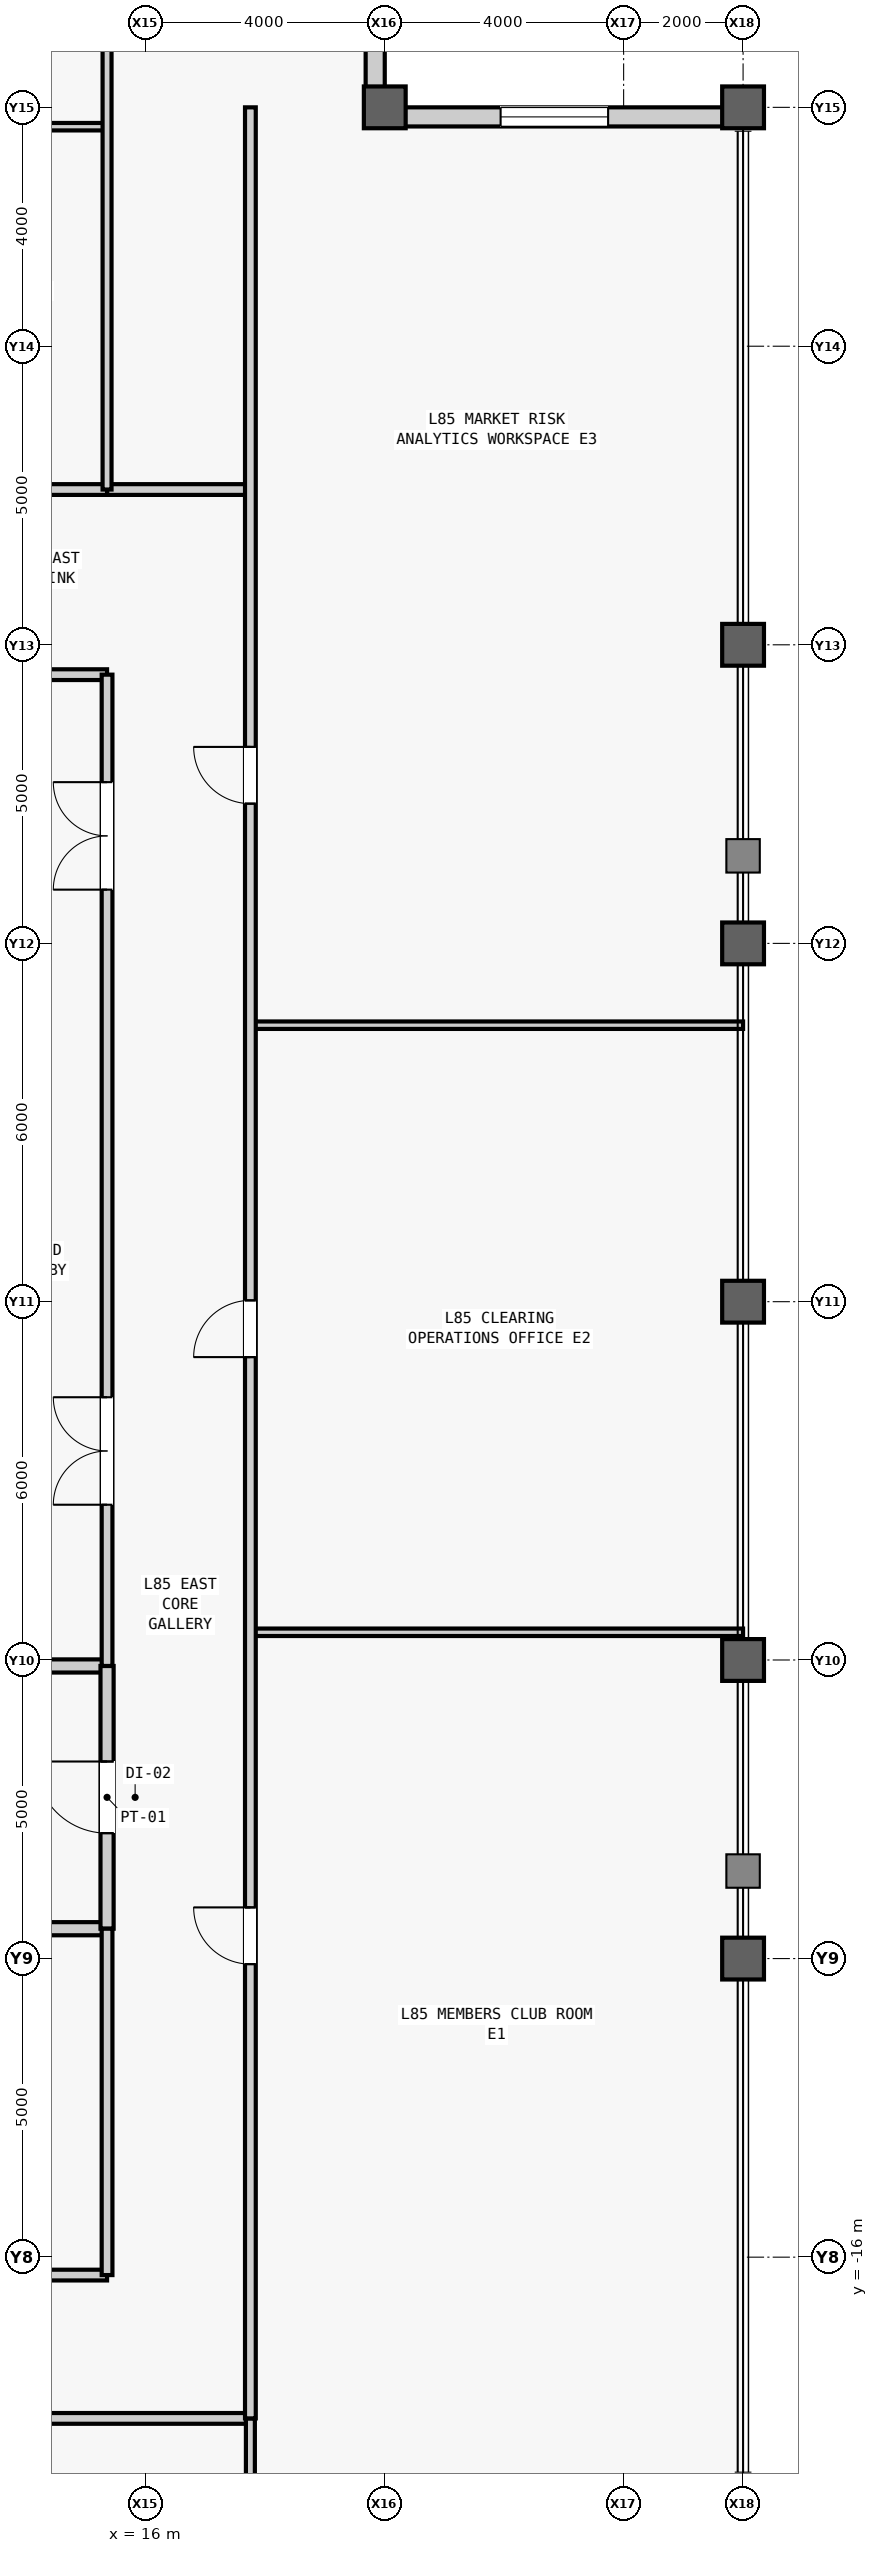
"""IFC4 building model, lengths in metres.
Left out: names, types, materials, properties, quantities, classifications, styles, units other than length and angle.
Written with IfcOpenShell. Run it as: python <this file> out.ifc"""

import sys

from ifc_helpers import new_model, si_unit, direction, frame, frame_2d, origin, origin_2d, place, context, subcontext, project, spatial, rectangle, hollow_rectangle, extrude, source, transform, mapped, element, fill, save


model = new_model("IFC4")
c1 = context("Model", 3, precision=1e-05, world=origin(), true_north=direction((0.0, 1.0)))
c2 = subcontext(c1, "Body", "Model", "MODEL_VIEW")
j1 = project(units=[si_unit("LENGTHUNIT", "METRE"), si_unit("PLANEANGLEUNIT", "RADIAN")], contexts=[c1])
p1 = place(None, origin())
s1 = spatial("IfcSite", under=j1, at=p1, CompositionType="ELEMENT")
p2 = place(p1, origin())
s2 = spatial("IfcBuilding", under=s1, at=p2, CompositionType="ELEMENT")
p3 = place(p2, frame((0.0, 0.0, 358.3)))
s3 = spatial("IfcBuildingStorey", under=s2, at=p3, CompositionType="ELEMENT", Elevation=358.3)
m1 = source(origin(), c2, "Body", "SweptSolid", [
    extrude(hollow_rectangle(XDim=0.7, YDim=0.7, WallThickness=0.04, at=origin_2d()), origin(), (0.0, 0.0, 1.0), 4.0),
])
for number, where, z_axis, x_axis in (
    (1, (20.0, 20.0, 0.0), (0.0, 0.0, 1.0), (1.0, 0.0, 0.0)),
    (2, (26.0, -11.0, 0.0), (0.0, 0.0, 1.0), (1.0, 0.0, 0.0)),
    (3, (26.0, -6.0, 0.0), (0.0, 0.0, 1.0), (1.0, 0.0, 0.0)),
    (4, (26.0, 0.0, 0.0), (0.0, 0.0, 1.0), (1.0, 0.0, 0.0)),
    (5, (26.0, 6.0, 0.0), (0.0, 0.0, 1.0), (1.0, 0.0, 0.0)),
    (6, (26.0, 11.0, 0.0), (0.0, 0.0, 1.0), (1.0, 0.0, 0.0)),
    (7, (26.0, 20.0, 0.0), (0.0, 0.0, 1.0), (1.0, 0.0, 0.0)),
):
    element("IfcColumn", number, at=place(p3, frame(where, z_axis=z_axis, x_axis=x_axis)), inside=s3, PredefinedType="COLUMN", context=c2, shape_type="MappedRepresentation", body=[
        mapped(m1, transform((0.0, 0.0, 0.0), scale=1.0)),
    ])
m2 = source(origin(), c2, "Body", "SweptSolid", [
    extrude(rectangle(XDim=5.68, YDim=0.32, at=frame_2d((2.84, 0.0))), origin(), (0.0, 0.0, 1.0), 3.191),
])
p4 = place(p3, frame((20.0, 19.84, 0.0), z_axis=(0.0, 0.0, 1.0), x_axis=(1.0, 0.0, 0.0)))
e8 = element("IfcWall", 8, at=p4, inside=s3, PredefinedType="STANDARD", context=c2, shape_type="MappedRepresentation", body=[
    mapped(m2, transform((0.0, 0.0, 0.0), scale=1.0)),
])
m3 = source(origin(), c2, "Body", "SweptSolid", [
    extrude(rectangle(XDim=1.8, YDim=2.4, at=frame_2d((0.9, 1.2))), frame((0.0, 0.17, 0.0), z_axis=(0.0, -1.0, 0.0), x_axis=(1.0, 0.0, 0.0)), (0.0, 0.0, 1.0), 0.34),
])
p5 = place(p4, frame((1.94, 0.0, 0.5)))
e9 = element("IfcOpeningElement", 9, at=p5, cuts=e8, PredefinedType="OPENING", context=c2, shape_type="MappedRepresentation", body=[
    mapped(m3, transform((0.0, 0.0, 0.0), scale=1.0)),
])
p6 = place(p3, frame((19.84, 20.0, 0.0), z_axis=(0.0, 0.0, 1.0), x_axis=(0.0, 1.0, 0.0)))
e10 = element("IfcWall", 10, at=p6, inside=s3, PredefinedType="STANDARD", context=c2, shape_type="MappedRepresentation", body=[
    mapped(m2, transform((0.0, 0.0, 0.0), scale=1.0)),
])
p7 = place(p6, frame((1.94, 0.0, 0.5)))
e11 = element("IfcOpeningElement", 11, at=p7, cuts=e10, PredefinedType="OPENING", context=c2, shape_type="MappedRepresentation", body=[
    mapped(m3, transform((0.0, 0.0, 0.0), scale=1.0)),
])
m4 = source(origin(), c2, "Body", "SweptSolid", [
    extrude(rectangle(XDim=4.05, YDim=0.22, at=frame_2d((2.025, 0.0))), origin(), (0.0, 0.0, 1.0), 3.74),
])
p8 = place(p3, frame((11.3, -10.5, 0.0), z_axis=(0.0, 0.0, 1.0), x_axis=(1.0, 0.0, 0.0)))
e12 = element("IfcWall", 12, at=p8, inside=s3, PredefinedType="PARTITIONING", context=c2, shape_type="MappedRepresentation", body=[
    mapped(m4, transform((0.0, 0.0, 0.0), scale=1.0)),
])
m5 = source(origin(), c2, "Body", "SweptSolid", [
    extrude(rectangle(XDim=4.05, YDim=0.22, at=frame_2d((2.025, 0.0))), origin(), (0.0, 0.0, 1.0), 3.124),
])
p9 = place(p3, frame((11.3, -6.1, 0.0), z_axis=(0.0, 0.0, 1.0), x_axis=(1.0, 0.0, 0.0)))
e13 = element("IfcWall", 13, at=p9, inside=s3, PredefinedType="PARTITIONING", context=c2, shape_type="MappedRepresentation", body=[
    mapped(m5, transform((0.0, 0.0, 0.0), scale=1.0)),
])
m6 = source(origin(), c2, "Body", "SweptSolid", [
    extrude(rectangle(XDim=4.4, YDim=0.22, at=frame_2d((2.2, 0.0))), origin(), (0.0, 0.0, 1.0), 3.74),
])
p10 = place(p3, frame((15.35, -10.5, 0.0), z_axis=(0.0, 0.0, 1.0), x_axis=(0.0, 1.0, 0.0)))
e14 = element("IfcWall", 14, at=p10, inside=s3, PredefinedType="PARTITIONING", context=c2, shape_type="MappedRepresentation", body=[
    mapped(m6, transform((0.0, 0.0, 0.0), scale=1.0)),
])
m7 = source(origin(), c2, "Body", "SweptSolid", [
    extrude(rectangle(XDim=1.2, YDim=2.2, at=frame_2d((0.6, 1.1))), frame((0.0, 0.12, 0.0), z_axis=(0.0, -1.0, 0.0), x_axis=(1.0, 0.0, 0.0)), (0.0, 0.0, 1.0), 0.24),
])
p11 = place(p10, frame((1.6, 0.0, 0.0)))
e15 = element("IfcOpeningElement", 15, at=p11, cuts=e14, PredefinedType="OPENING", context=c2, shape_type="MappedRepresentation", body=[
    mapped(m7, transform((0.0, 0.0, 0.0), scale=1.0)),
])
m8 = source(origin(), c2, "Body", "SweptSolid", [
    extrude(rectangle(XDim=4.05, YDim=0.18, at=frame_2d((2.025, 0.0))), origin(), (0.0, 0.0, 1.0), 3.74),
])
p12 = place(p3, frame((11.3, 10.5, 0.0), z_axis=(0.0, 0.0, 1.0), x_axis=(1.0, 0.0, 0.0)))
e16 = element("IfcWall", 16, at=p12, inside=s3, PredefinedType="PARTITIONING", context=c2, shape_type="MappedRepresentation", body=[
    mapped(m8, transform((0.0, 0.0, 0.0), scale=1.0)),
])
m9 = source(origin(), c2, "Body", "SweptSolid", [
    extrude(rectangle(XDim=16.6, YDim=0.18, at=frame_2d((8.3, 0.0))), origin(), (0.0, 0.0, 1.0), 3.74),
])
p13 = place(p3, frame((15.35, -6.1, 0.0), z_axis=(0.0, 0.0, 1.0), x_axis=(0.0, 1.0, 0.0)))
e17 = element("IfcWall", 17, at=p13, inside=s3, PredefinedType="PARTITIONING", context=c2, shape_type="MappedRepresentation", body=[
    mapped(m9, transform((0.0, 0.0, 0.0), scale=1.0)),
])
m10 = source(origin(), c2, "Body", "SweptSolid", [
    extrude(rectangle(XDim=1.8, YDim=2.25, at=frame_2d((0.9, 1.125))), frame((0.0, 0.1, 0.0), z_axis=(0.0, -1.0, 0.0), x_axis=(1.0, 0.0, 0.0)), (0.0, 0.0, 1.0), 0.2),
])
p14 = place(p13, frame((2.7, 0.0, 0.0)))
e18 = element("IfcOpeningElement", 18, at=p14, cuts=e17, PredefinedType="OPENING", context=c2, shape_type="MappedRepresentation", body=[
    mapped(m10, transform((0.0, 0.0, 0.0), scale=1.0)),
])
p15 = place(p13, frame((13.0, 0.0, 0.0)))
e19 = element("IfcOpeningElement", 19, at=p15, cuts=e17, PredefinedType="OPENING", context=c2, shape_type="MappedRepresentation", body=[
    mapped(m10, transform((0.0, 0.0, 0.0), scale=1.0)),
])
m11 = source(origin(), c2, "Body", "SweptSolid", [
    extrude(rectangle(XDim=14.05, YDim=0.18, at=frame_2d((7.025, 0.0))), origin(), (0.0, 0.0, 1.0), 3.74),
])
p16 = place(p3, frame((1.3, -16.3, 0.0), z_axis=(0.0, 0.0, 1.0), x_axis=(1.0, 0.0, 0.0)))
e20 = element("IfcWall", 20, at=p16, inside=s3, PredefinedType="PARTITIONING", context=c2, shape_type="MappedRepresentation", body=[
    mapped(m11, transform((0.0, 0.0, 0.0), scale=1.0)),
])
m12 = source(origin(), c2, "Body", "SweptSolid", [
    extrude(rectangle(XDim=0.9, YDim=2.15, at=frame_2d((0.45, 1.075))), frame((0.0, 0.1, 0.0), z_axis=(0.0, -1.0, 0.0), x_axis=(1.0, 0.0, 0.0)), (0.0, 0.0, 1.0), 0.2),
])
p17 = place(p16, frame((6.25, 0.0, 0.0)))
e21 = element("IfcOpeningElement", 21, at=p17, cuts=e20, PredefinedType="OPENING", context=c2, shape_type="MappedRepresentation", body=[
    mapped(m12, transform((0.0, 0.0, 0.0), scale=1.0)),
])
m13 = source(origin(), c2, "Body", "SweptSolid", [
    extrude(rectangle(XDim=5.8, YDim=0.18, at=frame_2d((2.9, 0.0))), origin(), (0.0, 0.0, 1.0), 3.74),
])
p18 = place(p3, frame((15.35, -16.3, 0.0), z_axis=(0.0, 0.0, 1.0), x_axis=(0.0, 1.0, 0.0)))
e22 = element("IfcWall", 22, at=p18, inside=s3, PredefinedType="PARTITIONING", context=c2, shape_type="MappedRepresentation", body=[
    mapped(m13, transform((0.0, 0.0, 0.0), scale=1.0)),
])
m14 = source(origin(), c2, "Body", "SweptSolid", [
    extrude(rectangle(XDim=2.4, YDim=0.18, at=frame_2d((1.2, 0.0))), origin(), (0.0, 0.0, 1.0), 3.74),
])
p19 = place(p3, frame((15.35, 13.6, 0.0), z_axis=(0.0, 0.0, 1.0), x_axis=(1.0, 0.0, 0.0)))
e23 = element("IfcWall", 23, at=p19, inside=s3, PredefinedType="PARTITIONING", context=c2, shape_type="MappedRepresentation", body=[
    mapped(m14, transform((0.0, 0.0, 0.0), scale=1.0)),
])
m15 = source(origin(), c2, "Body", "SweptSolid", [
    extrude(rectangle(XDim=36.3, YDim=0.18, at=frame_2d((18.15, 0.0))), origin(), (0.0, 0.0, 1.0), 3.74),
])
p20 = place(p3, frame((-18.55, -18.7, 0.0), z_axis=(0.0, 0.0, 1.0), x_axis=(1.0, 0.0, 0.0)))
e24 = element("IfcWall", 24, at=p20, inside=s3, PredefinedType="PARTITIONING", context=c2, shape_type="MappedRepresentation", body=[
    mapped(m15, transform((0.0, 0.0, 0.0), scale=1.0)),
])
m16 = source(origin(), c2, "Body", "SweptSolid", [
    extrude(rectangle(XDim=1.05, YDim=2.2, at=frame_2d((0.525, 1.1))), frame((0.0, 0.1, 0.0), z_axis=(0.0, -1.0, 0.0), x_axis=(1.0, 0.0, 0.0)), (0.0, 0.0, 1.0), 0.2),
])
p21 = place(p20, frame((17.6, 0.0, 0.0)))
e25 = element("IfcOpeningElement", 25, at=p21, cuts=e24, PredefinedType="OPENING", context=c2, shape_type="MappedRepresentation", body=[
    mapped(m16, transform((0.0, 0.0, 0.0), scale=1.0)),
])
m17 = source(origin(), c2, "Body", "SweptSolid", [
    extrude(rectangle(XDim=7.3, YDim=0.15, at=frame_2d((3.65, 0.0))), origin(), (0.0, 0.0, 1.0), 3.74),
])
p22 = place(p3, frame((17.75, -26.0, 0.0), z_axis=(0.0, 0.0, 1.0), x_axis=(0.0, 1.0, 0.0)))
e26 = element("IfcWall", 26, at=p22, inside=s3, PredefinedType="PARTITIONING", context=c2, shape_type="MappedRepresentation", body=[
    mapped(m17, transform((0.0, 0.0, 0.0), scale=1.0)),
])
m18 = source(origin(), c2, "Body", "SweptSolid", [
    extrude(rectangle(XDim=7.205, YDim=0.125, at=frame_2d((3.603, 0.0))), origin(), (0.0, 0.0, 1.0), 3.393),
])
p23 = place(p3, frame((8.145, 19.676, 0.0), z_axis=(0.0, 0.0, 1.0), x_axis=(1.0, 0.0, 0.0)))
e27 = element("IfcWall", 27, at=p23, inside=s3, PredefinedType="PARTITIONING", context=c2, shape_type="MappedRepresentation", body=[
    mapped(m18, transform((0.0, 0.0, 0.0), scale=1.0)),
])
m19 = source(origin(), c2, "Body", "SweptSolid", [
    extrude(rectangle(XDim=0.95, YDim=2.15, at=frame_2d((0.475, 1.075))), frame((0.0, 0.073, 0.0), z_axis=(0.0, -1.0, 0.0), x_axis=(1.0, 0.0, 0.0)), (0.0, 0.0, 1.0), 0.145),
])
p24 = place(p23, frame((3.127, 0.0, 0.0)))
e28 = element("IfcOpeningElement", 28, at=p24, cuts=e27, PredefinedType="OPENING", context=c2, shape_type="MappedRepresentation", body=[
    mapped(m19, transform((0.0, 0.0, 0.0), scale=1.0)),
])
m20 = source(origin(), c2, "Body", "SweptSolid", [
    extrude(rectangle(XDim=32.75, YDim=0.18, at=frame_2d((16.375, 0.0))), origin(), (0.0, 0.0, 1.0), 3.74),
])
p25 = place(p3, frame((-17.4, 13.6, 0.0), z_axis=(0.0, 0.0, 1.0), x_axis=(1.0, 0.0, 0.0)))
e29 = element("IfcWall", 29, at=p25, inside=s3, PredefinedType="PARTITIONING", context=c2, shape_type="MappedRepresentation", body=[
    mapped(m20, transform((0.0, 0.0, 0.0), scale=1.0)),
])
p26 = place(p25, frame((23.948, 0.0, 0.0)))
e30 = element("IfcOpeningElement", 30, at=p26, cuts=e29, PredefinedType="OPENING", context=c2, shape_type="MappedRepresentation", body=[
    mapped(m16, transform((0.0, 0.0, 0.0), scale=1.0)),
])
p27 = place(p25, frame((28.147, 0.0, 0.0)))
e31 = element("IfcOpeningElement", 31, at=p27, cuts=e29, PredefinedType="OPENING", context=c2, shape_type="MappedRepresentation", body=[
    mapped(m16, transform((0.0, 0.0, 0.0), scale=1.0)),
])
m21 = source(origin(), c2, "Body", "SweptSolid", [
    extrude(rectangle(XDim=12.4, YDim=0.15, at=frame_2d((6.2, 0.0))), origin(), (0.0, 0.0, 1.0), 3.74),
])
p28 = place(p3, frame((15.35, 13.6, 0.0), z_axis=(0.0, 0.0, 1.0), x_axis=(0.0, 1.0, 0.0)))
e32 = element("IfcWall", 32, at=p28, inside=s3, PredefinedType="PARTITIONING", context=c2, shape_type="MappedRepresentation", body=[
    mapped(m21, transform((0.0, 0.0, 0.0), scale=1.0)),
])
m22 = source(origin(), c2, "Body", "SweptSolid", [
    extrude(rectangle(XDim=8.25, YDim=0.125, at=frame_2d((4.125, 0.0))), origin(), (0.0, 0.0, 1.0), 3.74),
])
for number, where, z_axis, x_axis in (
    (33, (17.75, -5.536, 0.0), (0.0, 0.0, 1.0), (1.0, 0.0, 0.0)),
    (34, (17.75, 4.63, 0.0), (0.0, 0.0, 1.0), (1.0, 0.0, 0.0)),
):
    element("IfcWall", number, at=place(p3, frame(where, z_axis=z_axis, x_axis=x_axis)), inside=s3, PredefinedType="PARTITIONING", context=c2, shape_type="MappedRepresentation", body=[
        mapped(m22, transform((0.0, 0.0, 0.0), scale=1.0)),
    ])
m23 = source(origin(), c2, "Body", "SweptSolid", [
    extrude(rectangle(XDim=38.7, YDim=0.18, at=frame_2d((19.35, 0.0))), origin(), (0.0, 0.0, 1.0), 3.74),
])
p29 = place(p3, frame((17.75, -18.7, 0.0), z_axis=(0.0, 0.0, 1.0), x_axis=(0.0, 1.0, 0.0)))
e35 = element("IfcWall", 35, at=p29, inside=s3, PredefinedType="PARTITIONING", context=c2, shape_type="MappedRepresentation", body=[
    mapped(m23, transform((0.0, 0.0, 0.0), scale=1.0)),
])
m24 = source(origin(), c2, "Body", "SweptSolid", [
    extrude(rectangle(XDim=0.95, YDim=2.15, at=frame_2d((0.475, 1.075))), frame((0.0, 0.1, 0.0), z_axis=(0.0, -1.0, 0.0), x_axis=(1.0, 0.0, 0.0)), (0.0, 0.0, 1.0), 0.2),
])
p30 = place(p29, frame((7.607, 0.0, 0.0)))
e36 = element("IfcOpeningElement", 36, at=p30, cuts=e35, PredefinedType="OPENING", context=c2, shape_type="MappedRepresentation", body=[
    mapped(m24, transform((0.0, 0.0, 0.0), scale=1.0)),
])
p31 = place(p29, frame((17.772, 0.0, 0.0)))
e37 = element("IfcOpeningElement", 37, at=p31, cuts=e35, PredefinedType="OPENING", context=c2, shape_type="MappedRepresentation", body=[
    mapped(m24, transform((0.0, 0.0, 0.0), scale=1.0)),
])
p32 = place(p29, frame((27.04, 0.0, 0.0)))
e38 = element("IfcOpeningElement", 38, at=p32, cuts=e35, PredefinedType="OPENING", context=c2, shape_type="MappedRepresentation", body=[
    mapped(m24, transform((0.0, 0.0, 0.0), scale=1.0)),
])
m25 = source(origin(), c2, "Body", "SweptSolid", [
    extrude(rectangle(XDim=1.8, YDim=2.4, at=frame_2d((0.9, 1.2))), frame((0.0, 0.03, 0.0), z_axis=(0.0, -1.0, 0.0), x_axis=(1.0, 0.0, 0.0)), (0.0, 0.0, 1.0), 0.06),
])
p33 = place(p5, origin())
e39 = element("IfcWindow", 39, at=p33, inside=s3, PartitioningType="SINGLE_PANEL", PredefinedType="WINDOW", context=c2, shape_type="MappedRepresentation", body=[
    mapped(m25, transform((0.0, 0.0, 0.0), scale=1.0)),
])
fill(e9, e39)
m26 = source(origin(), c2, "Body", "SweptSolid", [
    extrude(rectangle(XDim=1.2, YDim=2.2, at=frame_2d((0.6, 1.1))), frame((0.0, 0.025, 0.0), z_axis=(0.0, -1.0, 0.0), x_axis=(1.0, 0.0, 0.0)), (0.0, 0.0, 1.0), 0.05),
])
p34 = place(p11, origin())
e40 = element("IfcDoor", 40, at=p34, inside=s3, OperationType="SINGLE_SWING_RIGHT", PredefinedType="DOOR", context=c2, shape_type="MappedRepresentation", body=[
    mapped(m26, transform((0.0, 0.0, 0.0), scale=1.0)),
])
fill(e15, e40)
m27 = source(origin(), c2, "Body", "SweptSolid", [
    extrude(rectangle(XDim=1.8, YDim=2.25, at=frame_2d((0.9, 1.125))), frame((0.0, 0.025, 0.0), z_axis=(0.0, -1.0, 0.0), x_axis=(1.0, 0.0, 0.0)), (0.0, 0.0, 1.0), 0.05),
])
p35 = place(p14, origin())
e41 = element("IfcDoor", 41, at=p35, inside=s3, OperationType="SINGLE_SWING_RIGHT", PredefinedType="DOOR", context=c2, shape_type="MappedRepresentation", body=[
    mapped(m27, transform((0.0, 0.0, 0.0), scale=1.0)),
])
fill(e18, e41)
p36 = place(p15, origin())
e42 = element("IfcDoor", 42, at=p36, inside=s3, OperationType="SINGLE_SWING_LEFT", PredefinedType="DOOR", context=c2, shape_type="MappedRepresentation", body=[
    mapped(m27, transform((0.0, 0.0, 0.0), scale=1.0)),
])
fill(e19, e42)
m28 = source(origin(), c2, "Body", "SweptSolid", [
    extrude(rectangle(XDim=0.95, YDim=2.15, at=frame_2d((0.475, 1.075))), frame((0.0, 0.025, 0.0), z_axis=(0.0, -1.0, 0.0), x_axis=(1.0, 0.0, 0.0)), (0.0, 0.0, 1.0), 0.05),
])
p37 = place(p30, origin())
e43 = element("IfcDoor", 43, at=p37, inside=s3, OperationType="SINGLE_SWING_RIGHT", PredefinedType="DOOR", context=c2, shape_type="MappedRepresentation", body=[
    mapped(m28, transform((0.0, 0.0, 0.0), scale=1.0)),
])
fill(e36, e43)
p38 = place(p31, origin())
e44 = element("IfcDoor", 44, at=p38, inside=s3, OperationType="SINGLE_SWING_LEFT", PredefinedType="DOOR", context=c2, shape_type="MappedRepresentation", body=[
    mapped(m28, transform((0.0, 0.0, 0.0), scale=1.0)),
])
fill(e37, e44)
p39 = place(p32, origin())
e45 = element("IfcDoor", 45, at=p39, inside=s3, OperationType="SINGLE_SWING_RIGHT", PredefinedType="DOOR", context=c2, shape_type="MappedRepresentation", body=[
    mapped(m28, transform((0.0, 0.0, 0.0), scale=1.0)),
])
fill(e38, e45)
save(model, sys.argv[1])
